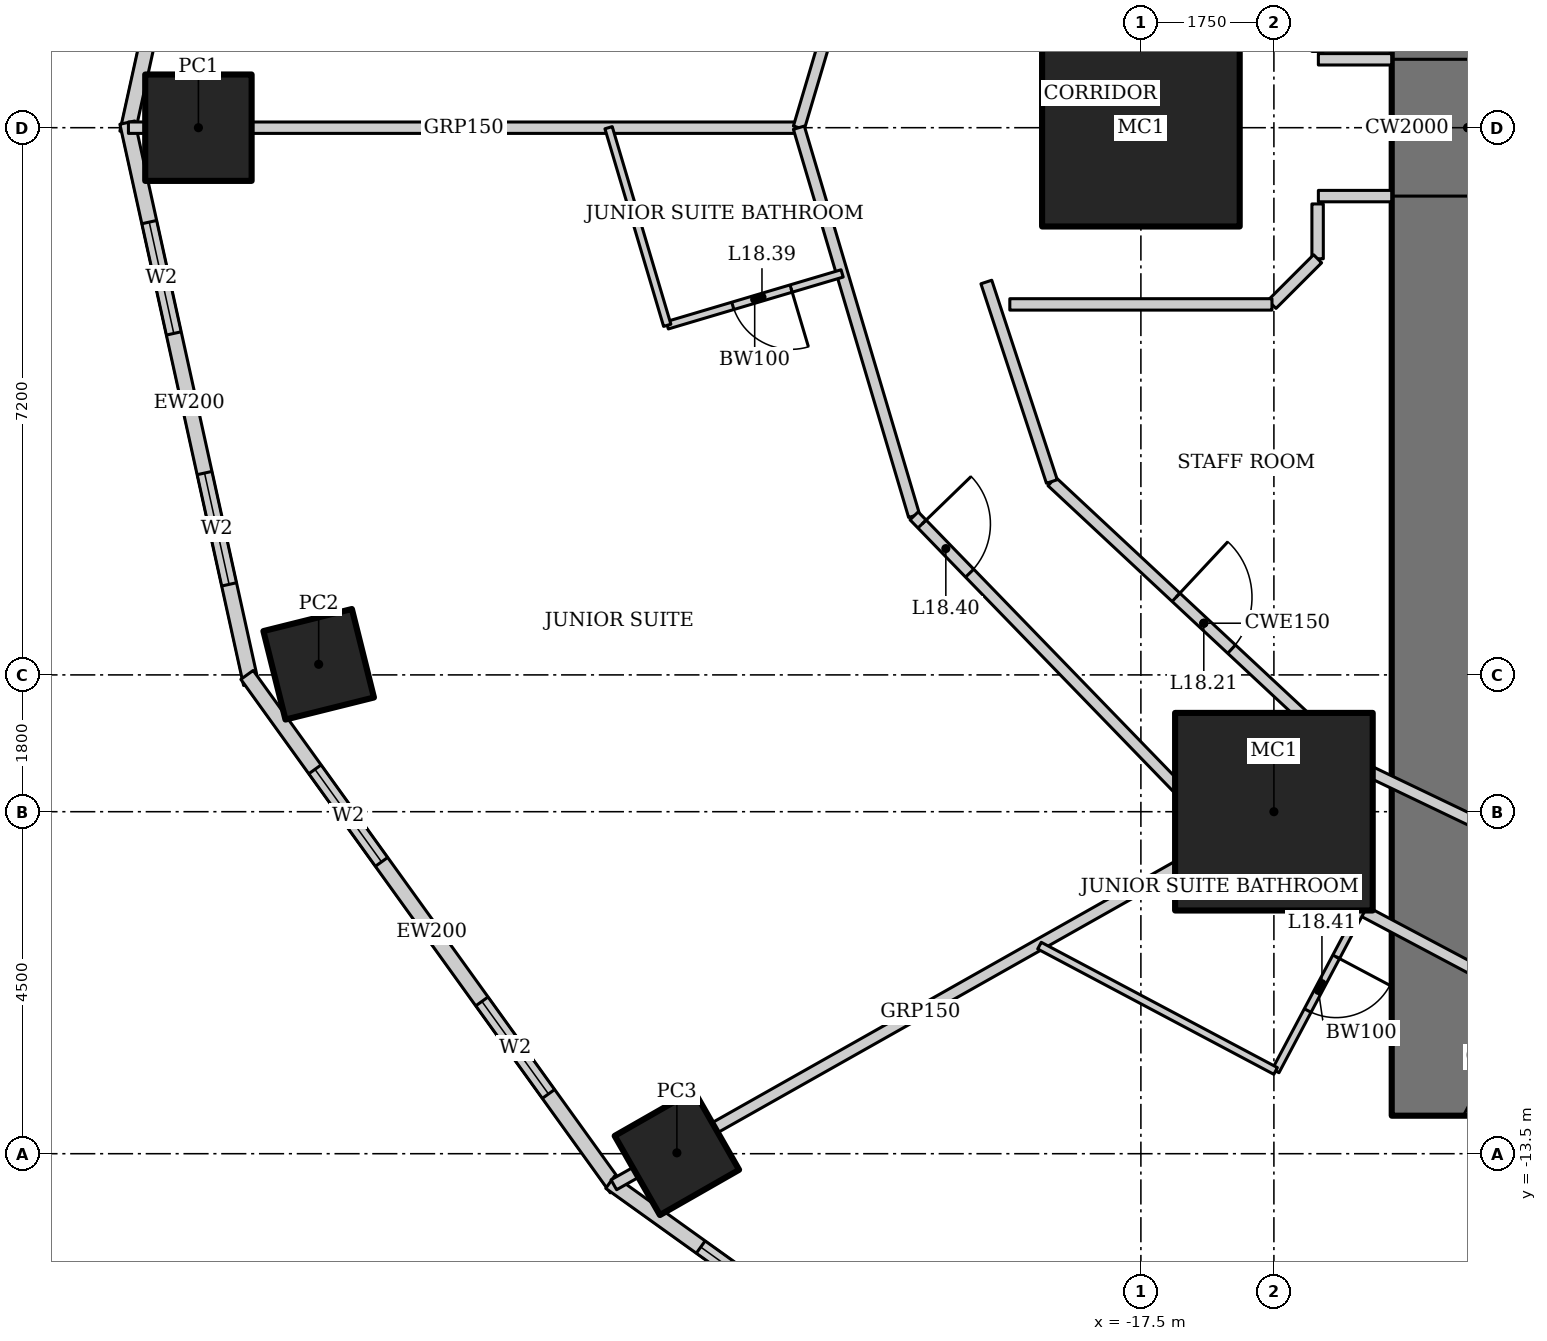
"""IFC4 building model, lengths in metres.
Left out: names, types, materials, properties, quantities, classifications, styles, units other than length and angle.
Written with IfcOpenShell. Run it as: python <this file> out.ifc"""

import sys

from ifc_helpers import new_model, si_unit, direction, frame, frame_2d, origin, origin_2d, place, context, subcontext, project, spatial, rectangle, hollow_rectangle, extrude, element, fill, save


model = new_model("IFC4")
c1 = context("Model", 3, precision=1e-05, world=origin(), true_north=direction((0.0, 1.0)))
c2 = subcontext(c1, "Body", "Model", "MODEL_VIEW")
j1 = project(units=[si_unit("LENGTHUNIT", "METRE"), si_unit("PLANEANGLEUNIT", "RADIAN")], contexts=[c1])
p1 = place(None, origin())
s1 = spatial("IfcSite", under=j1, at=p1, CompositionType="ELEMENT")
p2 = place(p1, origin())
s2 = spatial("IfcBuilding", under=s1, at=p2, CompositionType="ELEMENT")
p3 = place(p2, frame((0.0, 0.0, 80.2)))
s3 = spatial("IfcBuildingStorey", under=s2, at=p3, CompositionType="ELEMENT", Elevation=80.2)
for number, where, z_axis, x_axis in (
    (1, (-17.5, 0.0, 0.0), (0.0, 0.0, 1.0), (1.0, 0.0, 0.0)),
    (2, (-15.75, -9.0, 0.0), (0.0, 0.0, 1.0), (1.0, 0.0, 0.0)),
):
    element("IfcColumn", number, at=place(p3, frame(where, z_axis=z_axis, x_axis=x_axis)), inside=s3, PredefinedType="COLUMN", context=c2, shape_type="SweptSolid", body=[
        extrude(hollow_rectangle(XDim=2.6, YDim=2.6, WallThickness=0.13, at=origin_2d()), origin(), (0.0, 0.0, 1.0), 3.6),
    ])
p4 = place(p3, frame((-29.9, 0.0, 0.0), z_axis=(0.0, 0.0, 1.0), x_axis=(1.0, 0.0, 0.0)))
e3 = element("IfcColumn", 3, at=p4, inside=s3, PredefinedType="COLUMN", context=c2, shape_type="SweptSolid", body=[
    extrude(hollow_rectangle(XDim=1.4, YDim=1.4, WallThickness=0.1, at=origin_2d()), origin(), (0.0, 0.0, 1.0), 3.6),
])
p5 = place(p3, frame((-28.318, -7.06, 0.0), z_axis=(0.0, 0.0, 1.0), x_axis=(0.970295726276, 0.2419218956, 0.0)))
e4 = element("IfcColumn", 4, at=p5, inside=s3, PredefinedType="COLUMN", context=c2, shape_type="SweptSolid", body=[
    extrude(hollow_rectangle(XDim=1.2, YDim=1.2, WallThickness=0.1, at=origin_2d()), origin(), (0.0, 0.0, 1.0), 3.6),
])
p6 = place(p3, frame((-23.605, -13.489, 0.0), z_axis=(0.0, 0.0, 1.0), x_axis=(0.86824298017, 0.496139221777, 0.0)))
e5 = element("IfcColumn", 5, at=p6, inside=s3, PredefinedType="COLUMN", context=c2, shape_type="SweptSolid", body=[
    extrude(hollow_rectangle(XDim=1.2, YDim=1.2, WallThickness=0.12, at=origin_2d()), origin(), (0.0, 0.0, 1.0), 3.6),
])
p7 = place(p3, frame((-13.2, 13.0, 0.0), z_axis=(0.0, 0.0, 1.0), x_axis=(0.0, -1.0, 0.0)))
e6 = element("IfcWall", 6, at=p7, inside=s3, PredefinedType="SHEAR", context=c2, shape_type="SweptSolid", body=[
    extrude(rectangle(XDim=26.0, YDim=2.0, at=frame_2d((13.0, 0.0))), origin(), (0.0, 0.0, 1.0), 3.6),
])
p8 = place(p7, frame((12.1, 0.0, 0.0)))
e7 = element("IfcOpeningElement", 7, at=p8, cuts=e6, PredefinedType="OPENING", context=c2, shape_type="SweptSolid", body=[
    extrude(rectangle(XDim=1.8, YDim=2.1, at=frame_2d((0.9, 1.05))), frame((0.0, 1.01, 0.0), z_axis=(0.0, -1.0, 0.0), x_axis=(1.0, 0.0, 0.0)), (0.0, 0.0, 1.0), 2.02),
])
p9 = place(p3, frame((-29.208, 7.318, 0.0), z_axis=(0.0, 0.0, 1.0), x_axis=(-0.215238065514, -0.976561608478, 0.0)))
e8 = element("IfcWall", 8, at=p9, inside=s3, PredefinedType="SOLIDWALL", context=c2, shape_type="SweptSolid", body=[
    extrude(rectangle(XDim=7.562, YDim=0.2, at=frame_2d((3.781, 0.0))), origin(), (0.0, 0.0, 1.0), 3.45),
])
p10 = place(p9, frame((1.341, 0.0, 0.5)))
e9 = element("IfcOpeningElement", 9, at=p10, cuts=e8, PredefinedType="OPENING", context=c2, shape_type="SweptSolid", body=[
    extrude(rectangle(XDim=1.5, YDim=2.2, at=frame_2d((0.75, 1.1))), frame((0.0, 0.11, 0.0), z_axis=(0.0, -1.0, 0.0), x_axis=(1.0, 0.0, 0.0)), (0.0, 0.0, 1.0), 0.22),
])
p11 = place(p9, frame((4.722, 0.0, 0.5)))
e10 = element("IfcOpeningElement", 10, at=p11, cuts=e8, PredefinedType="OPENING", context=c2, shape_type="SweptSolid", body=[
    extrude(rectangle(XDim=1.5, YDim=2.2, at=frame_2d((0.75, 1.1))), frame((0.0, 0.11, 0.0), z_axis=(0.0, -1.0, 0.0), x_axis=(1.0, 0.0, 0.0)), (0.0, 0.0, 1.0), 0.22),
])
p12 = place(p3, frame((-30.835, 0.067, 0.0), z_axis=(0.0, 0.0, 1.0), x_axis=(0.215238065514, -0.976561608478, 0.0)))
e11 = element("IfcWall", 11, at=p12, inside=s3, PredefinedType="SOLIDWALL", context=c2, shape_type="SweptSolid", body=[
    extrude(rectangle(XDim=7.562, YDim=0.2, at=frame_2d((3.781, 0.0))), origin(), (0.0, 0.0, 1.0), 3.45),
])
p13 = place(p12, frame((1.341, 0.0, 0.5)))
e12 = element("IfcOpeningElement", 12, at=p13, cuts=e11, PredefinedType="OPENING", context=c2, shape_type="SweptSolid", body=[
    extrude(rectangle(XDim=1.5, YDim=2.2, at=frame_2d((0.75, 1.1))), frame((0.0, 0.11, 0.0), z_axis=(0.0, -1.0, 0.0), x_axis=(1.0, 0.0, 0.0)), (0.0, 0.0, 1.0), 0.22),
])
p14 = place(p12, frame((4.722, 0.0, 0.5)))
e13 = element("IfcOpeningElement", 13, at=p14, cuts=e11, PredefinedType="OPENING", context=c2, shape_type="SweptSolid", body=[
    extrude(rectangle(XDim=1.5, YDim=2.2, at=frame_2d((0.75, 1.1))), frame((0.0, 0.11, 0.0), z_axis=(0.0, -1.0, 0.0), x_axis=(1.0, 0.0, 0.0)), (0.0, 0.0, 1.0), 0.22),
])
p15 = place(p3, frame((-29.26, -7.2, 0.0), z_axis=(0.0, 0.0, 1.0), x_axis=(0.583937613703, -0.811798536155, 0.0)))
e14 = element("IfcWall", 14, at=p15, inside=s3, PredefinedType="SOLIDWALL", context=c2, shape_type="SweptSolid", body=[
    extrude(rectangle(XDim=8.323, YDim=0.2, at=frame_2d((4.162, 0.0))), origin(), (0.0, 0.0, 1.0), 3.45),
])
p16 = place(p15, frame((1.531, 0.0, 0.5)))
e15 = element("IfcOpeningElement", 15, at=p16, cuts=e14, PredefinedType="OPENING", context=c2, shape_type="SweptSolid", body=[
    extrude(rectangle(XDim=1.5, YDim=2.2, at=frame_2d((0.75, 1.1))), frame((0.0, 0.11, 0.0), z_axis=(0.0, -1.0, 0.0), x_axis=(1.0, 0.0, 0.0)), (0.0, 0.0, 1.0), 0.22),
])
p17 = place(p15, frame((5.292, 0.0, 0.5)))
e16 = element("IfcOpeningElement", 16, at=p17, cuts=e14, PredefinedType="OPENING", context=c2, shape_type="SweptSolid", body=[
    extrude(rectangle(XDim=1.5, YDim=2.2, at=frame_2d((0.75, 1.1))), frame((0.0, 0.11, 0.0), z_axis=(0.0, -1.0, 0.0), x_axis=(1.0, 0.0, 0.0)), (0.0, 0.0, 1.0), 0.22),
])
p18 = place(p3, frame((-24.482, -13.875, 0.0), z_axis=(0.0, 0.0, 1.0), x_axis=(0.812791321576, -0.582554948112, 0.0)))
e17 = element("IfcWall", 17, at=p18, inside=s3, PredefinedType="SOLIDWALL", context=c2, shape_type="SweptSolid", body=[
    extrude(rectangle(XDim=8.063, YDim=0.2, at=frame_2d((4.032, 0.0))), origin(), (0.0, 0.0, 1.0), 3.45),
])
p19 = place(p18, frame((1.466, 0.0, 0.5)))
e18 = element("IfcOpeningElement", 18, at=p19, cuts=e17, PredefinedType="OPENING", context=c2, shape_type="SweptSolid", body=[
    extrude(rectangle(XDim=1.5, YDim=2.2, at=frame_2d((0.75, 1.1))), frame((0.0, 0.11, 0.0), z_axis=(0.0, -1.0, 0.0), x_axis=(1.0, 0.0, 0.0)), (0.0, 0.0, 1.0), 0.22),
])
p20 = place(p18, frame((5.097, 0.0, 0.5)))
e19 = element("IfcOpeningElement", 19, at=p20, cuts=e17, PredefinedType="OPENING", context=c2, shape_type="SweptSolid", body=[
    extrude(rectangle(XDim=1.5, YDim=2.2, at=frame_2d((0.75, 1.1))), frame((0.0, 0.11, 0.0), z_axis=(0.0, -1.0, 0.0), x_axis=(1.0, 0.0, 0.0)), (0.0, 0.0, 1.0), 0.22),
])
p21 = place(p3, frame((-30.821, 0.0, 0.0), z_axis=(0.0, 0.0, 1.0), x_axis=(1.0, 0.0, 0.0)))
e20 = element("IfcWall", 20, at=p21, inside=s3, PredefinedType="PARTITIONING", context=c2, shape_type="SweptSolid", body=[
    extrude(rectangle(XDim=8.821, YDim=0.15, at=frame_2d((4.41, 0.0))), origin(), (0.0, 0.0, 1.0), 2.528),
])
p22 = place(p3, frame((-24.435, -13.909, 0.0), z_axis=(0.0, 0.0, 1.0), x_axis=(0.870744406136, 0.491735883563, 0.0)))
e21 = element("IfcWall", 21, at=p22, inside=s3, PredefinedType="PARTITIONING", context=c2, shape_type="SweptSolid", body=[
    extrude(rectangle(XDim=9.263, YDim=0.15, at=frame_2d((4.631, 0.0))), origin(), (0.0, 0.0, 1.0), 2.693),
])
p23 = place(p3, frame((-20.484, 5.107, 0.0), z_axis=(0.0, 0.0, 1.0), x_axis=(-0.284584469409, -0.95865096869, 0.0)))
e22 = element("IfcWall", 22, at=p23, inside=s3, PredefinedType="PARTITIONING", context=c2, shape_type="SweptSolid", body=[
    extrude(rectangle(XDim=5.327, YDim=0.15, at=frame_2d((2.664, 0.0))), origin(), (0.0, 0.0, 1.0), 3.45),
])
p24 = place(p23, frame((0.15, 0.0, 0.0)))
e23 = element("IfcOpeningElement", 23, at=p24, cuts=e22, PredefinedType="OPENING", context=c2, shape_type="SweptSolid", body=[
    extrude(rectangle(XDim=0.9, YDim=2.1, at=frame_2d((0.45, 1.05))), frame((0.0, 0.085, 0.0), z_axis=(0.0, -1.0, 0.0), x_axis=(1.0, 0.0, 0.0)), (0.0, 0.0, 1.0), 0.17),
])
p25 = place(p3, frame((-22.0, 0.0, 0.0), z_axis=(0.0, 0.0, 1.0), x_axis=(0.284584469409, -0.95865096869, 0.0)))
e24 = element("IfcWall", 24, at=p25, inside=s3, PredefinedType="PARTITIONING", context=c2, shape_type="SweptSolid", body=[
    extrude(rectangle(XDim=5.327, YDim=0.15, at=frame_2d((2.664, 0.0))), origin(), (0.0, 0.0, 1.0), 3.45),
])
p26 = place(p3, frame((-20.484, -5.107, 0.0), z_axis=(0.0, 0.0, 1.0), x_axis=(0.695871090686, -0.71816671125, 0.0)))
e25 = element("IfcWall", 25, at=p26, inside=s3, PredefinedType="PARTITIONING", context=c2, shape_type="SweptSolid", body=[
    extrude(rectangle(XDim=5.913, YDim=0.15, at=frame_2d((2.957, 0.0))), origin(), (0.0, 0.0, 1.0), 3.45),
])
p27 = place(p26, frame((0.15, 0.0, 0.0)))
e26 = element("IfcOpeningElement", 26, at=p27, cuts=e25, PredefinedType="OPENING", context=c2, shape_type="SweptSolid", body=[
    extrude(rectangle(XDim=0.9, YDim=2.1, at=frame_2d((0.45, 1.05))), frame((0.0, 0.085, 0.0), z_axis=(0.0, -1.0, 0.0), x_axis=(1.0, 0.0, 0.0)), (0.0, 0.0, 1.0), 0.17),
])
p28 = place(p3, frame((-16.369, -9.354, 0.0), z_axis=(0.0, 0.0, 1.0), x_axis=(0.883334368785, -0.468743419071, 0.0)))
e27 = element("IfcWall", 27, at=p28, inside=s3, PredefinedType="PARTITIONING", context=c2, shape_type="SweptSolid", body=[
    extrude(rectangle(XDim=5.491, YDim=0.15, at=frame_2d((2.746, 0.0))), origin(), (0.0, 0.0, 1.0), 3.45),
])
p29 = place(p3, frame((-18.672, -4.655, 0.0), z_axis=(0.0, 0.0, 1.0), x_axis=(0.731260145007, -0.682098673452, 0.0)))
e28 = element("IfcWall", 28, at=p29, inside=s3, PredefinedType="PARTITIONING", context=c2, shape_type="SweptSolid", body=[
    extrude(rectangle(XDim=5.468, YDim=0.15, at=frame_2d((2.734, 0.0))), origin(), (0.0, 0.0, 1.0), 3.45),
])
p30 = place(p29, frame((2.234, 0.0, 0.0)))
e29 = element("IfcOpeningElement", 29, at=p30, cuts=e28, PredefinedType="OPENING", context=c2, shape_type="SweptSolid", body=[
    extrude(rectangle(XDim=1.0, YDim=2.1, at=frame_2d((0.5, 1.05))), frame((0.0, 0.085, 0.0), z_axis=(0.0, -1.0, 0.0), x_axis=(1.0, 0.0, 0.0)), (0.0, 0.0, 1.0), 0.17),
])
p31 = place(p3, frame((-14.673, -8.385, 0.0), z_axis=(0.0, 0.0, 1.0), x_axis=(0.901869692799, -0.43200816799, 0.0)))
e30 = element("IfcWall", 30, at=p31, inside=s3, PredefinedType="PARTITIONING", context=c2, shape_type="SweptSolid", body=[
    extrude(rectangle(XDim=4.986, YDim=0.15, at=frame_2d((2.493, 0.0))), origin(), (0.0, 0.0, 1.0), 3.45),
])
p32 = place(p3, frame((-21.431, -1.917, 0.0), z_axis=(0.0, 0.0, 1.0), x_axis=(-0.958639927723, -0.284621659356, 0.0)))
e31 = element("IfcWall", 31, at=p32, inside=s3, PredefinedType="PARTITIONING", context=c2, shape_type="SweptSolid", body=[
    extrude(rectangle(XDim=2.4, YDim=0.1, at=frame_2d((1.2, 0.0))), origin(), (0.0, 0.0, 1.0), 3.45),
])
p33 = place(p32, frame((0.7, 0.0, 0.0)))
e32 = element("IfcOpeningElement", 32, at=p33, cuts=e31, PredefinedType="OPENING", context=c2, shape_type="SweptSolid", body=[
    extrude(rectangle(XDim=0.8, YDim=2.1, at=frame_2d((0.4, 1.05))), frame((0.0, 0.06, 0.0), z_axis=(0.0, -1.0, 0.0), x_axis=(1.0, 0.0, 0.0)), (0.0, 0.0, 1.0), 0.12),
])
p34 = place(p3, frame((-23.732, -2.6, 0.0), z_axis=(0.0, 0.0, 1.0), x_axis=(-0.284514277473, 0.958671803025, 0.0)))
e33 = element("IfcWall", 33, at=p34, inside=s3, PredefinedType="PARTITIONING", context=c2, shape_type="SweptSolid", body=[
    extrude(rectangle(XDim=2.712, YDim=0.1, at=frame_2d((1.356, 0.0))), origin(), (0.0, 0.0, 1.0), 3.45),
])
p35 = place(p3, frame((-14.602, -10.291, 0.0), z_axis=(0.0, 0.0, 1.0), x_axis=(-0.468770886208, -0.883319792739, 0.0)))
e34 = element("IfcWall", 34, at=p35, inside=s3, PredefinedType="PARTITIONING", context=c2, shape_type="SweptSolid", body=[
    extrude(rectangle(XDim=2.4, YDim=0.1, at=frame_2d((1.2, 0.0))), origin(), (0.0, 0.0, 1.0), 3.45),
])
p36 = place(p35, frame((0.7, 0.0, 0.0)))
e35 = element("IfcOpeningElement", 35, at=p36, cuts=e34, PredefinedType="OPENING", context=c2, shape_type="SweptSolid", body=[
    extrude(rectangle(XDim=0.8, YDim=2.1, at=frame_2d((0.4, 1.05))), frame((0.0, 0.06, 0.0), z_axis=(0.0, -1.0, 0.0), x_axis=(1.0, 0.0, 0.0)), (0.0, 0.0, 1.0), 0.12),
])
p37 = place(p3, frame((-15.727, -12.411, 0.0), z_axis=(0.0, 0.0, 1.0), x_axis=(-0.88335195308, 0.468710280439, 0.0)))
e36 = element("IfcWall", 36, at=p37, inside=s3, PredefinedType="PARTITIONING", context=c2, shape_type="SweptSolid", body=[
    extrude(rectangle(XDim=3.518, YDim=0.1, at=frame_2d((1.759, 0.0))), origin(), (0.0, 0.0, 1.0), 3.45),
])
p38 = place(p3, frame((-13.2, -13.0, 0.0), z_axis=(0.0, 0.0, 1.0), x_axis=(0.46874717052, 0.88333237806, 0.0)))
e37 = element("IfcWall", 37, at=p38, inside=s3, PredefinedType="PARTITIONING", context=c2, shape_type="SweptSolid", body=[
    extrude(rectangle(XDim=1.735, YDim=0.1, at=frame_2d((0.868, 0.0))), origin(), (0.0, 0.0, 1.0), 3.45),
])
p39 = place(p3, frame((-19.533, -2.03, 0.0), z_axis=(0.0, 0.0, 1.0), x_axis=(0.311929965981, -0.950105097515, 0.0)))
e38 = element("IfcWall", 38, at=p39, inside=s3, PredefinedType="PARTITIONING", context=c2, shape_type="SweptSolid", body=[
    extrude(rectangle(XDim=2.763, YDim=0.15, at=frame_2d((1.381, 0.0))), origin(), (0.0, 0.0, 1.0), 3.45),
])
for number, where, z_axis, x_axis in (
    (39, (-14.2, -0.9, 0.0), (0.0, 0.0, 1.0), (-1.0, 0.0, 0.0)),
    (40, (-14.2, 0.9, 0.0), (0.0, 0.0, 1.0), (-1.0, 0.0, 0.0)),
):
    element("IfcWall", number, at=place(p3, frame(where, z_axis=z_axis, x_axis=x_axis)), inside=s3, PredefinedType="PARTITIONING", context=c2, shape_type="SweptSolid", body=[
        extrude(rectangle(XDim=0.965, YDim=0.15, at=frame_2d((0.482, 0.0))), origin(), (0.0, 0.0, 1.0), 3.45),
    ])
p40 = place(p3, frame((-15.175, -1.003, 0.0), z_axis=(0.0, 0.0, 1.0), x_axis=(0.0, -1.0, 0.0)))
e41 = element("IfcWall", 41, at=p40, inside=s3, PredefinedType="PARTITIONING", context=c2, shape_type="SweptSolid", body=[
    extrude(rectangle(XDim=0.721, YDim=0.15, at=frame_2d((0.361, 0.0))), origin(), (0.0, 0.0, 1.0), 3.45),
])
p41 = place(p3, frame((-15.175, -1.725, 0.0), z_axis=(0.0, 0.0, 1.0), x_axis=(-0.707106781187, -0.707106781187, 0.0)))
e42 = element("IfcWall", 42, at=p41, inside=s3, PredefinedType="PARTITIONING", context=c2, shape_type="SweptSolid", body=[
    extrude(rectangle(XDim=0.849, YDim=0.15, at=frame_2d((0.425, 0.0))), origin(), (0.0, 0.0, 1.0), 3.45),
])
p42 = place(p3, frame((-15.775, -2.325, 0.0), z_axis=(0.0, 0.0, 1.0), x_axis=(-1.0, 0.0, 0.0)))
e43 = element("IfcWall", 43, at=p42, inside=s3, PredefinedType="PARTITIONING", context=c2, shape_type="SweptSolid", body=[
    extrude(rectangle(XDim=3.449, YDim=0.15, at=frame_2d((1.725, 0.0))), origin(), (0.0, 0.0, 1.0), 3.45),
])
p43 = place(p13, origin())
e44 = element("IfcWindow", 44, at=p43, inside=s3, PartitioningType="SINGLE_PANEL", PredefinedType="WINDOW", context=c2, shape_type="SweptSolid", body=[
    extrude(rectangle(XDim=1.5, YDim=2.2, at=frame_2d((0.75, 1.1))), frame((0.0, 0.03, 0.0), z_axis=(0.0, -1.0, 0.0), x_axis=(1.0, 0.0, 0.0)), (0.0, 0.0, 1.0), 0.06),
])
fill(e12, e44)
p44 = place(p14, origin())
e45 = element("IfcWindow", 45, at=p44, inside=s3, PartitioningType="SINGLE_PANEL", PredefinedType="WINDOW", context=c2, shape_type="SweptSolid", body=[
    extrude(rectangle(XDim=1.5, YDim=2.2, at=frame_2d((0.75, 1.1))), frame((0.0, 0.03, 0.0), z_axis=(0.0, -1.0, 0.0), x_axis=(1.0, 0.0, 0.0)), (0.0, 0.0, 1.0), 0.06),
])
fill(e13, e45)
p45 = place(p16, origin())
e46 = element("IfcWindow", 46, at=p45, inside=s3, PartitioningType="SINGLE_PANEL", PredefinedType="WINDOW", context=c2, shape_type="SweptSolid", body=[
    extrude(rectangle(XDim=1.5, YDim=2.2, at=frame_2d((0.75, 1.1))), frame((0.0, 0.03, 0.0), z_axis=(0.0, -1.0, 0.0), x_axis=(1.0, 0.0, 0.0)), (0.0, 0.0, 1.0), 0.06),
])
fill(e15, e46)
p46 = place(p17, origin())
e47 = element("IfcWindow", 47, at=p46, inside=s3, PartitioningType="SINGLE_PANEL", PredefinedType="WINDOW", context=c2, shape_type="SweptSolid", body=[
    extrude(rectangle(XDim=1.5, YDim=2.2, at=frame_2d((0.75, 1.1))), frame((0.0, 0.03, 0.0), z_axis=(0.0, -1.0, 0.0), x_axis=(1.0, 0.0, 0.0)), (0.0, 0.0, 1.0), 0.06),
])
fill(e16, e47)
p47 = place(p19, origin())
e48 = element("IfcWindow", 48, at=p47, inside=s3, PartitioningType="SINGLE_PANEL", PredefinedType="WINDOW", context=c2, shape_type="SweptSolid", body=[
    extrude(rectangle(XDim=1.5, YDim=2.2, at=frame_2d((0.75, 1.1))), frame((0.0, 0.03, 0.0), z_axis=(0.0, -1.0, 0.0), x_axis=(1.0, 0.0, 0.0)), (0.0, 0.0, 1.0), 0.06),
])
fill(e18, e48)
p48 = place(p8, origin())
e49 = element("IfcDoor", 49, at=p48, inside=s3, OperationType="DOUBLE_DOOR_DOUBLE_SWING", PredefinedType="DOOR", context=c2, shape_type="SweptSolid", body=[
    extrude(rectangle(XDim=1.8, YDim=2.1, at=frame_2d((0.9, 1.05))), frame((0.0, 0.025, 0.0), z_axis=(0.0, -1.0, 0.0), x_axis=(1.0, 0.0, 0.0)), (0.0, 0.0, 1.0), 0.05),
])
fill(e7, e49)
p49 = place(p30, origin())
e50 = element("IfcDoor", 50, at=p49, inside=s3, OperationType="SINGLE_SWING_LEFT", PredefinedType="DOOR", context=c2, shape_type="SweptSolid", body=[
    extrude(rectangle(XDim=1.0, YDim=2.1, at=frame_2d((0.5, 1.05))), frame((0.0, 0.025, 0.0), z_axis=(0.0, -1.0, 0.0), x_axis=(1.0, 0.0, 0.0)), (0.0, 0.0, 1.0), 0.05),
])
fill(e29, e50)
p50 = place(p33, origin())
e51 = element("IfcDoor", 51, at=p50, inside=s3, OperationType="SINGLE_SWING_LEFT", PredefinedType="DOOR", context=c2, shape_type="SweptSolid", body=[
    extrude(rectangle(XDim=0.8, YDim=2.1, at=frame_2d((0.4, 1.05))), frame((0.0, 0.025, 0.0), z_axis=(0.0, -1.0, 0.0), x_axis=(1.0, 0.0, 0.0)), (0.0, 0.0, 1.0), 0.05),
])
fill(e32, e51)
p51 = place(p27, origin())
e52 = element("IfcDoor", 52, at=p51, inside=s3, OperationType="SINGLE_SWING_LEFT", PredefinedType="DOOR", context=c2, shape_type="SweptSolid", body=[
    extrude(rectangle(XDim=0.9, YDim=2.1, at=frame_2d((0.45, 1.05))), frame((0.0, 0.025, 0.0), z_axis=(0.0, -1.0, 0.0), x_axis=(1.0, 0.0, 0.0)), (0.0, 0.0, 1.0), 0.05),
])
fill(e26, e52)
p52 = place(p36, origin())
e53 = element("IfcDoor", 53, at=p52, inside=s3, OperationType="SINGLE_SWING_LEFT", PredefinedType="DOOR", context=c2, shape_type="SweptSolid", body=[
    extrude(rectangle(XDim=0.8, YDim=2.1, at=frame_2d((0.4, 1.05))), frame((0.0, 0.025, 0.0), z_axis=(0.0, -1.0, 0.0), x_axis=(1.0, 0.0, 0.0)), (0.0, 0.0, 1.0), 0.05),
])
fill(e35, e53)
save(model, sys.argv[1])
